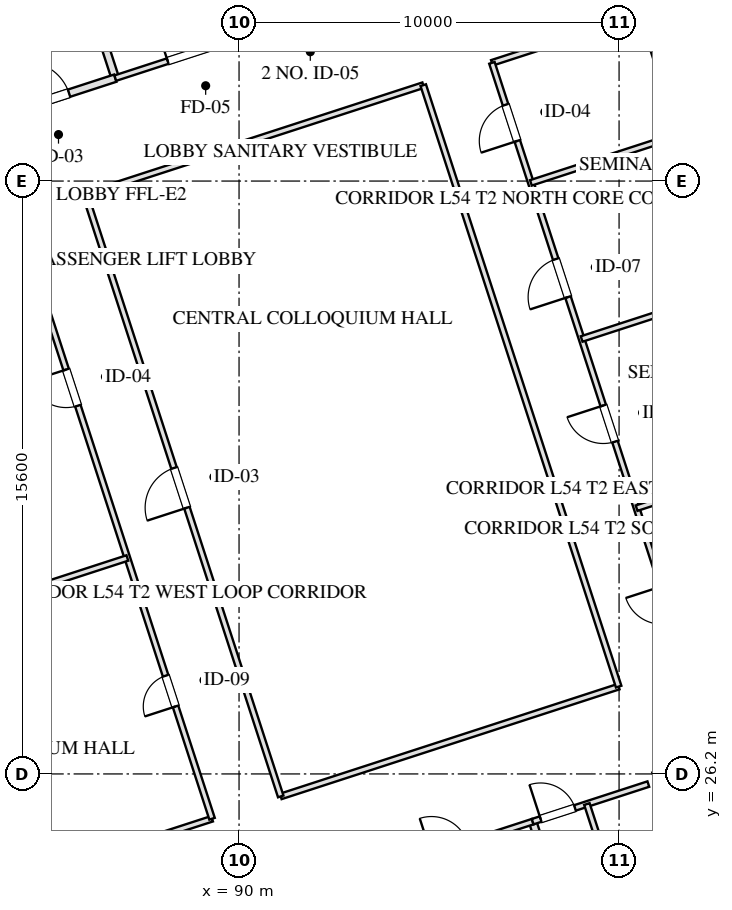
"""IFC4 building model, lengths in metres.
Left out: names, types, materials, properties, quantities, classifications, styles, units other than length and angle.
Written with IfcOpenShell. Run it as: python <this file> out.ifc"""

import sys

from ifc_helpers import new_model, si_unit, direction, frame, frame_2d, origin, place, context, subcontext, project, spatial, rectangle, extrude, element, fill, save


model = new_model("IFC4")
c1 = context("Model", 3, precision=1e-05, world=origin(), true_north=direction((0.0, 1.0)))
c2 = subcontext(c1, "Body", "Model", "MODEL_VIEW")
j1 = project(units=[si_unit("LENGTHUNIT", "METRE"), si_unit("PLANEANGLEUNIT", "RADIAN")], contexts=[c1])
p1 = place(None, origin())
s1 = spatial("IfcSite", under=j1, at=p1, CompositionType="ELEMENT")
p2 = place(p1, origin())
s2 = spatial("IfcBuilding", under=s1, at=p2, CompositionType="ELEMENT")
p3 = place(p2, frame((0.0, 0.0, 202.4)))
s3 = spatial("IfcBuildingStorey", under=s2, at=p3, CompositionType="ELEMENT", Elevation=202.4)
p4 = place(p3, frame((97.382, 56.586, 0.0), z_axis=(0.0, 0.0, 1.0), x_axis=(0.309016491071, -0.951056679828, 0.0)))
e1 = element("IfcWall", 1, at=p4, inside=s3, PredefinedType="SOLIDWALL", context=c2, shape_type="SweptSolid", body=[
    extrude(rectangle(XDim=38.4, YDim=0.4, at=frame_2d((19.2, 0.0))), origin(), (0.0, 0.0, 1.0), 2.61),
])
p5 = place(p4, frame((24.55, 0.0, 0.75)))
e2 = element("IfcOpeningElement", 2, at=p5, cuts=e1, PredefinedType="OPENING", context=c2, shape_type="SweptSolid", body=[
    extrude(rectangle(XDim=2.1, YDim=1.46, at=frame_2d((1.05, 0.73))), frame((0.0, 0.21, 0.0), z_axis=(0.0, -1.0, 0.0), x_axis=(1.0, 0.0, 0.0)), (0.0, 0.0, 1.0), 0.42),
])
p6 = place(p4, frame((20.75, 0.0, 0.75)))
e3 = element("IfcOpeningElement", 3, at=p6, cuts=e1, PredefinedType="OPENING", context=c2, shape_type="SweptSolid", body=[
    extrude(rectangle(XDim=2.1, YDim=1.46, at=frame_2d((1.05, 0.73))), frame((0.0, 0.21, 0.0), z_axis=(0.0, -1.0, 0.0), x_axis=(1.0, 0.0, 0.0)), (0.0, 0.0, 1.0), 0.42),
])
p7 = place(p4, frame((15.55, 0.0, 0.75)))
e4 = element("IfcOpeningElement", 4, at=p7, cuts=e1, PredefinedType="OPENING", context=c2, shape_type="SweptSolid", body=[
    extrude(rectangle(XDim=2.1, YDim=1.46, at=frame_2d((1.05, 0.73))), frame((0.0, 0.21, 0.0), z_axis=(0.0, -1.0, 0.0), x_axis=(1.0, 0.0, 0.0)), (0.0, 0.0, 1.0), 0.42),
])
p8 = place(p4, frame((11.75, 0.0, 0.75)))
e5 = element("IfcOpeningElement", 5, at=p8, cuts=e1, PredefinedType="OPENING", context=c2, shape_type="SweptSolid", body=[
    extrude(rectangle(XDim=2.1, YDim=1.46, at=frame_2d((1.05, 0.73))), frame((0.0, 0.21, 0.0), z_axis=(0.0, -1.0, 0.0), x_axis=(1.0, 0.0, 0.0)), (0.0, 0.0, 1.0), 0.42),
])
p9 = place(p3, frame((97.727, 24.944, 0.0), z_axis=(0.0, 0.0, 1.0), x_axis=(0.309016001439, -0.951056838919, 0.0)))
e6 = element("IfcWall", 6, at=p9, inside=s3, PredefinedType="PARTITIONING", context=c2, shape_type="SweptSolid", body=[
    extrude(rectangle(XDim=8.43, YDim=0.2, at=frame_2d((4.215, 0.0))), origin(), (0.0, 0.0, 1.0), 3.175),
])
p10 = place(p3, frame((93.542, 23.585, 0.0), z_axis=(0.0, 0.0, 1.0), x_axis=(0.951063829732, 0.308994485023, 0.0)))
e7 = element("IfcWall", 7, at=p10, inside=s3, PredefinedType="PARTITIONING", context=c2, shape_type="SweptSolid", body=[
    extrude(rectangle(XDim=4.4, YDim=0.15, at=frame_2d((2.2, 0.0))), origin(), (0.0, 0.0, 1.0), 3.175),
])
p11 = place(p10, frame((1.6, 0.0, 0.0)))
e8 = element("IfcOpeningElement", 8, at=p11, cuts=e7, PredefinedType="OPENING", context=c2, shape_type="SweptSolid", body=[
    extrude(rectangle(XDim=1.0, YDim=2.05, at=frame_2d((0.5, 1.025))), frame((0.0, 0.085, 0.0), z_axis=(0.0, -1.0, 0.0), x_axis=(1.0, 0.0, 0.0)), (0.0, 0.0, 1.0), 0.17),
])
p12 = place(p3, frame((97.727, 24.944, 0.0), z_axis=(0.0, 0.0, 1.0), x_axis=(0.951036872128, 0.309077446369, 0.0)))
e9 = element("IfcWall", 9, at=p12, inside=s3, PredefinedType="PARTITIONING", context=c2, shape_type="SweptSolid", body=[
    extrude(rectangle(XDim=3.2, YDim=0.15, at=frame_2d((1.6, 0.0))), origin(), (0.0, 0.0, 1.0), 3.175),
])
p13 = place(p12, frame((0.22, 0.0, 0.0)))
e10 = element("IfcOpeningElement", 10, at=p13, cuts=e9, PredefinedType="OPENING", context=c2, shape_type="SweptSolid", body=[
    extrude(rectangle(XDim=0.95, YDim=2.05, at=frame_2d((0.475, 1.025))), frame((0.0, 0.085, 0.0), z_axis=(0.0, -1.0, 0.0), x_axis=(1.0, 0.0, 0.0)), (0.0, 0.0, 1.0), 0.17),
])
p14 = place(p3, frame((99.153, 25.408, 0.0), z_axis=(0.0, 0.0, 1.0), x_axis=(0.309016001439, -0.951056838919, 0.0)))
e11 = element("IfcWall", 11, at=p14, inside=s3, PredefinedType="PARTITIONING", context=c2, shape_type="SweptSolid", body=[
    extrude(rectangle(XDim=8.43, YDim=0.15, at=frame_2d((4.215, 0.0))), origin(), (0.0, 0.0, 1.0), 3.175),
])
p15 = place(p14, frame((2.55, 0.0, 0.0)))
e12 = element("IfcOpeningElement", 12, at=p15, cuts=e11, PredefinedType="OPENING", context=c2, shape_type="SweptSolid", body=[
    extrude(rectangle(XDim=0.95, YDim=2.05, at=frame_2d((0.475, 1.025))), frame((0.0, 0.085, 0.0), z_axis=(0.0, -1.0, 0.0), x_axis=(1.0, 0.0, 0.0)), (0.0, 0.0, 1.0), 0.17),
])
p16 = place(p14, frame((5.8, 0.0, 0.0)))
e13 = element("IfcOpeningElement", 13, at=p16, cuts=e11, PredefinedType="OPENING", context=c2, shape_type="SweptSolid", body=[
    extrude(rectangle(XDim=0.9, YDim=2.05, at=frame_2d((0.45, 1.025))), frame((0.0, 0.085, 0.0), z_axis=(0.0, -1.0, 0.0), x_axis=(1.0, 0.0, 0.0)), (0.0, 0.0, 1.0), 0.17),
])
p17 = place(p3, frame((86.743, 44.508, 0.0), z_axis=(0.0, 0.0, 1.0), x_axis=(-0.309016001439, 0.951056838919, 0.0)))
e14 = element("IfcWall", 14, at=p17, inside=s3, PredefinedType="PARTITIONING", context=c2, shape_type="SweptSolid", body=[
    extrude(rectangle(XDim=8.43, YDim=0.2, at=frame_2d((4.215, 0.0))), origin(), (0.0, 0.0, 1.0), 3.175),
])
p18 = place(p3, frame((83.101, 43.324, 0.0), z_axis=(0.0, 0.0, 1.0), x_axis=(0.951052804469, 0.309028417967, 0.0)))
e15 = element("IfcWall", 15, at=p18, inside=s3, PredefinedType="PARTITIONING", context=c2, shape_type="SweptSolid", body=[
    extrude(rectangle(XDim=3.83, YDim=0.2, at=frame_2d((1.915, 0.0))), origin(), (0.0, 0.0, 1.0), 3.175),
])
p19 = place(p18, frame((1.35, 0.0, 0.0)))
e16 = element("IfcOpeningElement", 16, at=p19, cuts=e15, PredefinedType="OPENING", context=c2, shape_type="SweptSolid", body=[
    extrude(rectangle(XDim=1.2, YDim=2.05, at=frame_2d((0.6, 1.025))), frame((0.0, 0.11, 0.0), z_axis=(0.0, -1.0, 0.0), x_axis=(1.0, 0.0, 0.0)), (0.0, 0.0, 1.0), 0.22),
])
p20 = place(p3, frame((86.743, 44.508, 0.0), z_axis=(0.0, 0.0, 1.0), x_axis=(0.951063829732, 0.308994485023, 0.0)))
e17 = element("IfcWall", 17, at=p20, inside=s3, PredefinedType="PARTITIONING", context=c2, shape_type="SweptSolid", body=[
    extrude(rectangle(XDim=4.4, YDim=0.15, at=frame_2d((2.2, 0.0))), origin(), (0.0, 0.0, 1.0), 3.175),
])
p21 = place(p20, frame((1.45, 0.0, 0.0)))
e18 = element("IfcOpeningElement", 18, at=p21, cuts=e17, PredefinedType="OPENING", context=c2, shape_type="SweptSolid", body=[
    extrude(rectangle(XDim=1.5, YDim=2.05, at=frame_2d((0.75, 1.025))), frame((0.0, 0.085, 0.0), z_axis=(0.0, -1.0, 0.0), x_axis=(1.0, 0.0, 0.0)), (0.0, 0.0, 1.0), 0.17),
])
p22 = place(p3, frame((79.447, 21.823, 0.0), z_axis=(0.0, 0.0, 1.0), x_axis=(0.951057294912, 0.309014598029, 0.0)))
e19 = element("IfcWall", 19, at=p22, inside=s3, PredefinedType="PARTITIONING", context=c2, shape_type="SweptSolid", body=[
    extrude(rectangle(XDim=10.35, YDim=0.15, at=frame_2d((5.175, 0.0))), origin(), (0.0, 0.0, 1.0), 3.175),
])
for number, where, z_axis, x_axis in (
    (20, (91.097, 25.608, 0.0), (0.0, 0.0, 1.0), (0.951, 0.309, 0.0)),
    (21, (85.955, 41.434, 0.0), (0.0, 0.0, 1.0), (0.951, 0.309, 0.0)),
):
    element("IfcWall", number, at=place(p3, frame(where, z_axis=z_axis, x_axis=x_axis)), inside=s3, PredefinedType="PARTITIONING", context=c2, shape_type="SweptSolid", body=[
        extrude(rectangle(XDim=9.35, YDim=0.15, at=frame_2d((4.675, 0.0))), origin(), (0.0, 0.0, 1.0), 3.175),
    ])
p23 = place(p3, frame((96.654, 44.91, 0.0), z_axis=(0.0, 0.0, 1.0), x_axis=(0.951044133184, 0.309055103076, 0.0)))
e22 = element("IfcWall", 22, at=p23, inside=s3, PredefinedType="PARTITIONING", context=c2, shape_type="SweptSolid", body=[
    extrude(rectangle(XDim=4.1, YDim=0.15, at=frame_2d((2.05, 0.0))), origin(), (0.0, 0.0, 1.0), 3.175),
])
p24 = place(p3, frame((89.29, 25.021, 0.0), z_axis=(0.0, 0.0, 1.0), x_axis=(-0.309004459387, 0.951060589068, 0.0)))
e23 = element("IfcWall", 23, at=p24, inside=s3, PredefinedType="PARTITIONING", context=c2, shape_type="SweptSolid", body=[
    extrude(rectangle(XDim=16.64, YDim=0.15, at=frame_2d((8.32, 0.0))), origin(), (0.0, 0.0, 1.0), 3.175),
])
p25 = place(p24, frame((3.107, 0.0, 0.0)))
e24 = element("IfcOpeningElement", 24, at=p25, cuts=e23, PredefinedType="OPENING", context=c2, shape_type="SweptSolid", body=[
    extrude(rectangle(XDim=0.85, YDim=2.05, at=frame_2d((0.425, 1.025))), frame((0.0, 0.085, 0.0), z_axis=(0.0, -1.0, 0.0), x_axis=(1.0, 0.0, 0.0)), (0.0, 0.0, 1.0), 0.17),
])
p26 = place(p24, frame((11.427, 0.0, 0.0)))
e25 = element("IfcOpeningElement", 25, at=p26, cuts=e23, PredefinedType="OPENING", context=c2, shape_type="SweptSolid", body=[
    extrude(rectangle(XDim=1.0, YDim=2.05, at=frame_2d((0.5, 1.025))), frame((0.0, 0.085, 0.0), z_axis=(0.0, -1.0, 0.0), x_axis=(1.0, 0.0, 0.0)), (0.0, 0.0, 1.0), 0.17),
])
p27 = place(p3, frame((91.097, 25.608, 0.0), z_axis=(0.0, 0.0, 1.0), x_axis=(-0.30901773025, 0.951056277195, 0.0)))
e26 = element("IfcWall", 26, at=p27, inside=s3, PredefinedType="PARTITIONING", context=c2, shape_type="SweptSolid", body=[
    extrude(rectangle(XDim=16.64, YDim=0.15, at=frame_2d((8.32, 0.0))), origin(), (0.0, 0.0, 1.0), 3.175),
])
p28 = place(p27, frame((7.987, 0.0, 0.0)))
e27 = element("IfcOpeningElement", 27, at=p28, cuts=e26, PredefinedType="OPENING", context=c2, shape_type="SweptSolid", body=[
    extrude(rectangle(XDim=1.1, YDim=2.05, at=frame_2d((0.55, 1.025))), frame((0.0, 0.085, 0.0), z_axis=(0.0, -1.0, 0.0), x_axis=(1.0, 0.0, 0.0)), (0.0, 0.0, 1.0), 0.17),
])
p29 = place(p3, frame((99.989, 28.498, 0.0), z_axis=(0.0, 0.0, 1.0), x_axis=(-0.30901773025, 0.951056277195, 0.0)))
e28 = element("IfcWall", 28, at=p29, inside=s3, PredefinedType="PARTITIONING", context=c2, shape_type="SweptSolid", body=[
    extrude(rectangle(XDim=16.64, YDim=0.15, at=frame_2d((8.32, 0.0))), origin(), (0.0, 0.0, 1.0), 3.175),
])
p30 = place(p3, frame((101.796, 29.085, 0.0), z_axis=(0.0, 0.0, 1.0), x_axis=(-0.309022042254, 0.951054876125, 0.0)))
e29 = element("IfcWall", 29, at=p30, inside=s3, PredefinedType="PARTITIONING", context=c2, shape_type="SweptSolid", body=[
    extrude(rectangle(XDim=16.64, YDim=0.15, at=frame_2d((8.32, 0.0))), origin(), (0.0, 0.0, 1.0), 3.175),
])
p31 = place(p30, frame((1.16, 0.0, 0.0)))
e30 = element("IfcOpeningElement", 30, at=p31, cuts=e29, PredefinedType="OPENING", context=c2, shape_type="SweptSolid", body=[
    extrude(rectangle(XDim=1.0, YDim=2.05, at=frame_2d((0.5, 1.025))), frame((0.0, 0.085, 0.0), z_axis=(0.0, -1.0, 0.0), x_axis=(1.0, 0.0, 0.0)), (0.0, 0.0, 1.0), 0.17),
])
p32 = place(p30, frame((6.16, 0.0, 0.0)))
e31 = element("IfcOpeningElement", 31, at=p32, cuts=e29, PredefinedType="OPENING", context=c2, shape_type="SweptSolid", body=[
    extrude(rectangle(XDim=1.0, YDim=2.05, at=frame_2d((0.5, 1.025))), frame((0.0, 0.085, 0.0), z_axis=(0.0, -1.0, 0.0), x_axis=(1.0, 0.0, 0.0)), (0.0, 0.0, 1.0), 0.17),
])
p33 = place(p30, frame((10.16, 0.0, 0.0)))
e32 = element("IfcOpeningElement", 32, at=p33, cuts=e29, PredefinedType="OPENING", context=c2, shape_type="SweptSolid", body=[
    extrude(rectangle(XDim=1.05, YDim=2.05, at=frame_2d((0.525, 1.025))), frame((0.0, 0.085, 0.0), z_axis=(0.0, -1.0, 0.0), x_axis=(1.0, 0.0, 0.0)), (0.0, 0.0, 1.0), 0.17),
])
p34 = place(p30, frame((14.48, 0.0, 0.0)))
e33 = element("IfcOpeningElement", 33, at=p34, cuts=e29, PredefinedType="OPENING", context=c2, shape_type="SweptSolid", body=[
    extrude(rectangle(XDim=1.0, YDim=2.05, at=frame_2d((0.5, 1.025))), frame((0.0, 0.085, 0.0), z_axis=(0.0, -1.0, 0.0), x_axis=(1.0, 0.0, 0.0)), (0.0, 0.0, 1.0), 0.17),
])
p35 = place(p3, frame((77.217, 28.684, 0.0), z_axis=(0.0, 0.0, 1.0), x_axis=(0.951059547341, 0.309007665621, 0.0)))
e34 = element("IfcWall", 34, at=p35, inside=s3, PredefinedType="PARTITIONING", context=c2, shape_type="SweptSolid", body=[
    extrude(rectangle(XDim=10.35, YDim=0.15, at=frame_2d((5.175, 0.0))), origin(), (0.0, 0.0, 1.0), 3.175),
])
p36 = place(p3, frame((100.461, 33.193, 0.0), z_axis=(0.0, 0.0, 1.0), x_axis=(0.951061634685, 0.309001241148, 0.0)))
e35 = element("IfcWall", 35, at=p36, inside=s3, PredefinedType="PARTITIONING", context=c2, shape_type="SweptSolid", body=[
    extrude(rectangle(XDim=4.1, YDim=0.15, at=frame_2d((2.05, 0.0))), origin(), (0.0, 0.0, 1.0), 3.175),
])
for number, where, z_axis, x_axis in (
    (36, (99.015, 37.644, 0.0), (0.0, 0.0, 1.0), (0.951, 0.309, 0.0)),
    (37, (97.68, 41.753, 0.0), (0.0, 0.0, 1.0), (0.951, 0.309, 0.0)),
):
    element("IfcWall", number, at=place(p3, frame(where, z_axis=z_axis, x_axis=x_axis)), inside=s3, PredefinedType="PARTITIONING", context=c2, shape_type="SweptSolid", body=[
        extrude(rectangle(XDim=4.1, YDim=0.15, at=frame_2d((2.05, 0.0))), origin(), (0.0, 0.0, 1.0), 3.175),
    ])
p37 = place(p13, origin())
e38 = element("IfcDoor", 38, at=p37, inside=s3, OperationType="SINGLE_SWING_LEFT", PredefinedType="DOOR", context=c2, shape_type="SweptSolid", body=[
    extrude(rectangle(XDim=0.95, YDim=2.05, at=frame_2d((0.475, 1.025))), frame((0.0, 0.025, 0.0), z_axis=(0.0, -1.0, 0.0), x_axis=(1.0, 0.0, 0.0)), (0.0, 0.0, 1.0), 0.05),
])
fill(e10, e38)
p38 = place(p19, origin())
e39 = element("IfcDoor", 39, at=p38, inside=s3, OperationType="SINGLE_SWING_LEFT", PredefinedType="DOOR", context=c2, shape_type="SweptSolid", body=[
    extrude(rectangle(XDim=1.2, YDim=2.05, at=frame_2d((0.6, 1.025))), frame((0.0, 0.025, 0.0), z_axis=(0.0, -1.0, 0.0), x_axis=(1.0, 0.0, 0.0)), (0.0, 0.0, 1.0), 0.05),
])
fill(e16, e39)
p39 = place(p21, origin())
e40 = element("IfcDoor", 40, at=p39, inside=s3, OperationType="SINGLE_SWING_LEFT", PredefinedType="DOOR", context=c2, shape_type="SweptSolid", body=[
    extrude(rectangle(XDim=1.5, YDim=2.05, at=frame_2d((0.75, 1.025))), frame((0.0, 0.025, 0.0), z_axis=(0.0, -1.0, 0.0), x_axis=(1.0, 0.0, 0.0)), (0.0, 0.0, 1.0), 0.05),
])
fill(e18, e40)
p40 = place(p25, origin())
e41 = element("IfcDoor", 41, at=p40, inside=s3, OperationType="SINGLE_SWING_LEFT", PredefinedType="DOOR", context=c2, shape_type="SweptSolid", body=[
    extrude(rectangle(XDim=0.85, YDim=2.05, at=frame_2d((0.425, 1.025))), frame((0.0, 0.025, 0.0), z_axis=(0.0, -1.0, 0.0), x_axis=(1.0, 0.0, 0.0)), (0.0, 0.0, 1.0), 0.05),
])
fill(e24, e41)
p41 = place(p26, origin())
e42 = element("IfcDoor", 42, at=p41, inside=s3, OperationType="SINGLE_SWING_RIGHT", PredefinedType="DOOR", context=c2, shape_type="SweptSolid", body=[
    extrude(rectangle(XDim=1.0, YDim=2.05, at=frame_2d((0.5, 1.025))), frame((0.0, 0.025, 0.0), z_axis=(0.0, -1.0, 0.0), x_axis=(1.0, 0.0, 0.0)), (0.0, 0.0, 1.0), 0.05),
])
fill(e25, e42)
p42 = place(p28, origin())
e43 = element("IfcDoor", 43, at=p42, inside=s3, OperationType="SINGLE_SWING_LEFT", PredefinedType="DOOR", context=c2, shape_type="SweptSolid", body=[
    extrude(rectangle(XDim=1.1, YDim=2.05, at=frame_2d((0.55, 1.025))), frame((0.0, 0.025, 0.0), z_axis=(0.0, -1.0, 0.0), x_axis=(1.0, 0.0, 0.0)), (0.0, 0.0, 1.0), 0.05),
])
fill(e27, e43)
p43 = place(p32, origin())
e44 = element("IfcDoor", 44, at=p43, inside=s3, OperationType="SINGLE_SWING_RIGHT", PredefinedType="DOOR", context=c2, shape_type="SweptSolid", body=[
    extrude(rectangle(XDim=1.0, YDim=2.05, at=frame_2d((0.5, 1.025))), frame((0.0, 0.025, 0.0), z_axis=(0.0, -1.0, 0.0), x_axis=(1.0, 0.0, 0.0)), (0.0, 0.0, 1.0), 0.05),
])
fill(e31, e44)
p44 = place(p33, origin())
e45 = element("IfcDoor", 45, at=p44, inside=s3, OperationType="SINGLE_SWING_LEFT", PredefinedType="DOOR", context=c2, shape_type="SweptSolid", body=[
    extrude(rectangle(XDim=1.05, YDim=2.05, at=frame_2d((0.525, 1.025))), frame((0.0, 0.025, 0.0), z_axis=(0.0, -1.0, 0.0), x_axis=(1.0, 0.0, 0.0)), (0.0, 0.0, 1.0), 0.05),
])
fill(e32, e45)
p45 = place(p34, origin())
e46 = element("IfcDoor", 46, at=p45, inside=s3, OperationType="SINGLE_SWING_LEFT", PredefinedType="DOOR", context=c2, shape_type="SweptSolid", body=[
    extrude(rectangle(XDim=1.0, YDim=2.05, at=frame_2d((0.5, 1.025))), frame((0.0, 0.025, 0.0), z_axis=(0.0, -1.0, 0.0), x_axis=(1.0, 0.0, 0.0)), (0.0, 0.0, 1.0), 0.05),
])
fill(e33, e46)
save(model, sys.argv[1])
